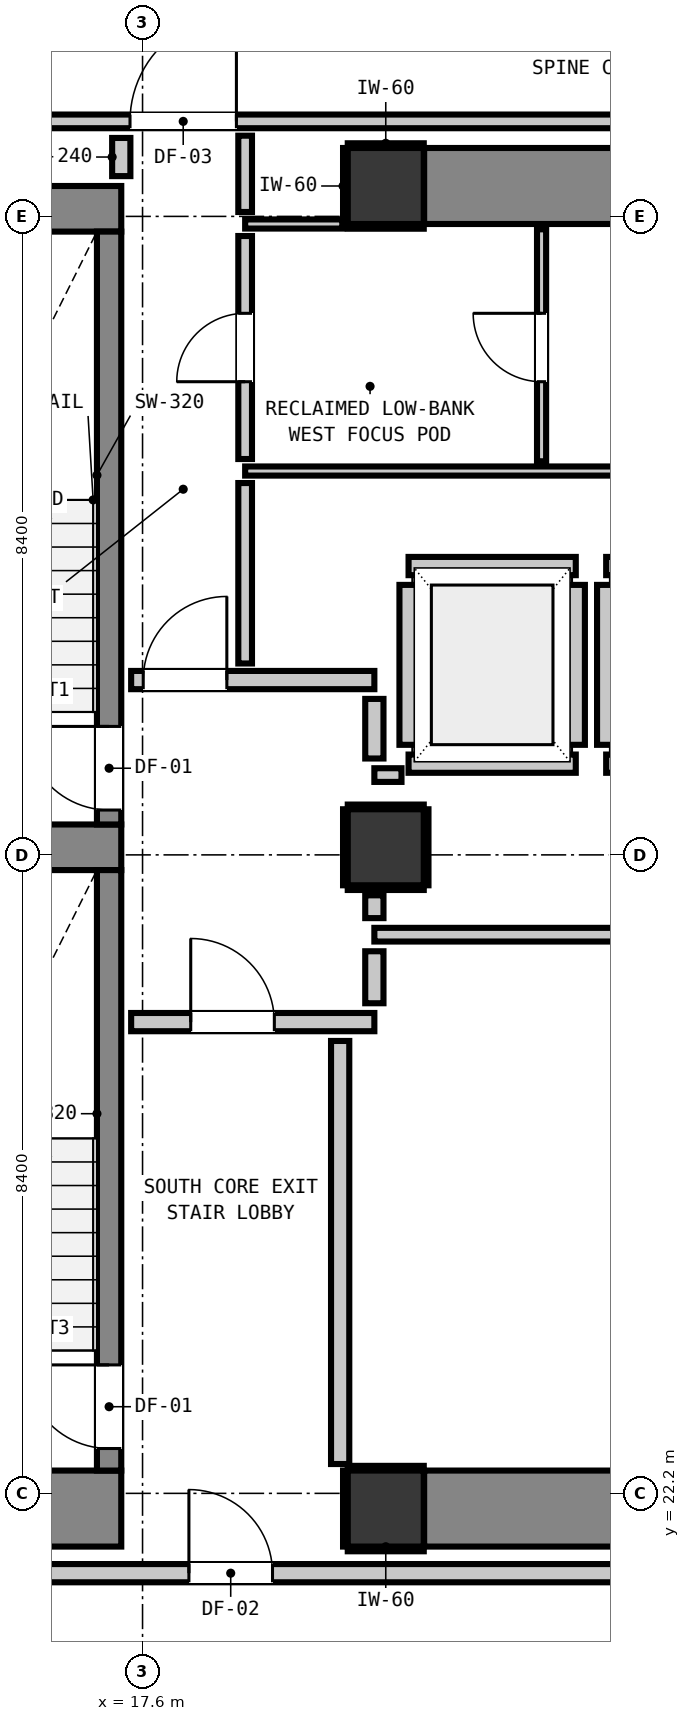
"""IFC4 building model, lengths in metres.
Left out: names, types, materials, properties, quantities, classifications, styles, units other than length and angle.
Written with IfcOpenShell. Run it as: python <this file> out.ifc"""

import sys

from ifc_helpers import new_model, si_unit, direction, frame, frame_2d, origin, origin_2d, place, context, subcontext, project, spatial, rectangle, extrude, element, fill, save


model = new_model("IFC4")
c1 = context("Model", 3, precision=1e-05, world=origin(), true_north=direction((0.0, 1.0)))
c2 = subcontext(c1, "Body", "Model", "MODEL_VIEW")
j1 = project(units=[si_unit("LENGTHUNIT", "METRE"), si_unit("PLANEANGLEUNIT", "RADIAN")], contexts=[c1])
p1 = place(None, origin())
s1 = spatial("IfcSite", under=j1, at=p1, CompositionType="ELEMENT")
p2 = place(p1, origin())
s2 = spatial("IfcBuilding", under=s1, at=p2, CompositionType="ELEMENT")
p3 = place(p2, frame((0.0, 0.0, 126.0)))
s3 = spatial("IfcBuildingStorey", under=s2, at=p3, CompositionType="ELEMENT", Elevation=126.0)
for number, where, z_axis, x_axis in (
    (1, (20.8, 22.0, 0.0), (0.0, 0.0, 1.0), (1.0, 0.0, 0.0)),
    (2, (20.8, 39.4, 0.0), (0.0, 0.0, 1.0), (1.0, 0.0, 0.0)),
):
    element("IfcColumn", number, at=place(p3, frame(where, z_axis=z_axis, x_axis=x_axis)), inside=s3, PredefinedType="COLUMN", context=c2, shape_type="SweptSolid", body=[
        extrude(rectangle(XDim=1.0, YDim=1.0, at=origin_2d()), origin(), (0.0, 0.0, 1.0), 3.32),
    ])
p4 = place(p3, frame((13.24, 22.0, 0.0), z_axis=(0.0, 0.0, 1.0), x_axis=(1.0, 0.0, 0.0)))
e3 = element("IfcWall", 3, at=p4, inside=s3, PredefinedType="SHEAR", context=c2, shape_type="SweptSolid", body=[
    extrude(rectangle(XDim=4.08, YDim=1.0, at=frame_2d((2.04, 0.0))), origin(), (0.0, 0.0, 1.0), 3.32),
])
p5 = place(p3, frame((13.24, 39.1, 0.0), z_axis=(0.0, 0.0, 1.0), x_axis=(1.0, 0.0, 0.0)))
e4 = element("IfcWall", 4, at=p5, inside=s3, PredefinedType="SHEAR", context=c2, shape_type="SweptSolid", body=[
    extrude(rectangle(XDim=4.08, YDim=0.6, at=frame_2d((2.04, 0.0))), origin(), (0.0, 0.0, 1.0), 3.32),
])
p6 = place(p3, frame((13.905, 30.7, 0.0), z_axis=(0.0, 0.0, 1.0), x_axis=(1.0, 0.0, 0.0)))
e5 = element("IfcWall", 5, at=p6, inside=s3, PredefinedType="SHEAR", context=c2, shape_type="SweptSolid", body=[
    extrude(rectangle(XDim=3.415, YDim=0.6, at=frame_2d((1.708, 0.0))), origin(), (0.0, 0.0, 1.0), 3.32),
])
for number, where, z_axis, x_axis in (
    (6, (21.305, 22.0, 0.0), (0.0, 0.0, 1.0), (1.0, 0.0, 0.0)),
    (7, (21.305, 39.4, 0.0), (0.0, 0.0, 1.0), (1.0, 0.0, 0.0)),
):
    element("IfcWall", number, at=place(p3, frame(where, z_axis=z_axis, x_axis=x_axis)), inside=s3, PredefinedType="SHEAR", context=c2, shape_type="SweptSolid", body=[
        extrude(rectangle(XDim=7.39, YDim=1.0, at=frame_2d((3.695, 0.0))), origin(), (0.0, 0.0, 1.0), 3.32),
    ])
p7 = place(p3, frame((17.16, 31.0, 0.0), z_axis=(0.0, 0.0, 1.0), x_axis=(0.0, 1.0, 0.0)))
e8 = element("IfcWall", 8, at=p7, inside=s3, PredefinedType="SHEAR", context=c2, shape_type="SweptSolid", body=[
    extrude(rectangle(XDim=7.8, YDim=0.32, at=frame_2d((3.9, 0.0))), origin(), (0.0, 0.0, 1.0), 3.32),
])
p8 = place(p7, frame((0.19, 0.0, 0.0)))
e9 = element("IfcOpeningElement", 9, at=p8, cuts=e8, PredefinedType="OPENING", context=c2, shape_type="SweptSolid", body=[
    extrude(rectangle(XDim=1.1, YDim=2.15, at=frame_2d((0.55, 1.075))), frame((0.0, 0.17, 0.0), z_axis=(0.0, -1.0, 0.0), x_axis=(1.0, 0.0, 0.0)), (0.0, 0.0, 1.0), 0.34),
])
p9 = place(p3, frame((17.16, 22.5, 0.0), z_axis=(0.0, 0.0, 1.0), x_axis=(0.0, 1.0, 0.0)))
e10 = element("IfcWall", 10, at=p9, inside=s3, PredefinedType="SHEAR", context=c2, shape_type="SweptSolid", body=[
    extrude(rectangle(XDim=7.9, YDim=0.32, at=frame_2d((3.95, 0.0))), origin(), (0.0, 0.0, 1.0), 3.32),
])
p10 = place(p9, frame((0.29, 0.0, 0.0)))
e11 = element("IfcOpeningElement", 11, at=p10, cuts=e10, PredefinedType="OPENING", context=c2, shape_type="SweptSolid", body=[
    extrude(rectangle(XDim=1.1, YDim=2.15, at=frame_2d((0.55, 1.075))), frame((0.0, 0.17, 0.0), z_axis=(0.0, -1.0, 0.0), x_axis=(1.0, 0.0, 0.0)), (0.0, 0.0, 1.0), 0.34),
])
p11 = place(p3, frame((20.8, 30.7, 0.0), z_axis=(0.0, 0.0, 1.0), x_axis=(1.0, 0.0, 0.0)))
e12 = element("IfcColumn", 12, at=p11, inside=s3, PredefinedType="COLUMN", context=c2, shape_type="SweptSolid", body=[
    extrude(rectangle(XDim=1.0, YDim=1.0, at=origin_2d()), origin(), (0.0, 0.0, 1.0), 3.32),
])
for number, where, z_axis, x_axis in (
    (13, (21.1, 31.8, 0.0), (0.0, 0.0, 1.0), (1.0, 0.0, 0.0)),
    (14, (21.1, 34.4, 0.0), (0.0, 0.0, 1.0), (1.0, 0.0, 0.0)),
):
    element("IfcWall", number, at=place(p3, frame(where, z_axis=z_axis, x_axis=x_axis)), inside=s3, PredefinedType="PARTITIONING", context=c2, shape_type="SweptSolid", body=[
        extrude(rectangle(XDim=2.2, YDim=0.24, at=frame_2d((1.1, 0.0))), origin(), (0.0, 0.0, 1.0), 3.08),
    ])
p12 = place(p3, frame((21.1, 32.048, 0.0), z_axis=(0.0, 0.0, 1.0), x_axis=(0.0, 1.0, 0.0)))
e15 = element("IfcWall", 15, at=p12, inside=s3, PredefinedType="PARTITIONING", context=c2, shape_type="SweptSolid", body=[
    extrude(rectangle(XDim=2.104, YDim=0.24, at=frame_2d((1.052, 0.0))), origin(), (0.0, 0.0, 1.0), 2.315),
])
p13 = place(p3, frame((23.3, 32.048, 0.0), z_axis=(0.0, 0.0, 1.0), x_axis=(0.0, 1.0, 0.0)))
e16 = element("IfcWall", 16, at=p13, inside=s3, PredefinedType="PARTITIONING", context=c2, shape_type="SweptSolid", body=[
    extrude(rectangle(XDim=2.104, YDim=0.24, at=frame_2d((1.052, 0.0))), origin(), (0.0, 0.0, 1.0), 3.08),
])
for number, where, z_axis, x_axis in (
    (17, (23.7, 31.8, 0.0), (0.0, 0.0, 1.0), (1.0, 0.0, 0.0)),
    (18, (23.7, 34.4, 0.0), (0.0, 0.0, 1.0), (1.0, 0.0, 0.0)),
):
    element("IfcWall", number, at=place(p3, frame(where, z_axis=z_axis, x_axis=x_axis)), inside=s3, PredefinedType="PARTITIONING", context=c2, shape_type="SweptSolid", body=[
        extrude(rectangle(XDim=2.2, YDim=0.24, at=frame_2d((1.1, 0.0))), origin(), (0.0, 0.0, 1.0), 3.08),
    ])
p14 = place(p3, frame((23.7, 32.048, 0.0), z_axis=(0.0, 0.0, 1.0), x_axis=(0.0, 1.0, 0.0)))
e19 = element("IfcWall", 19, at=p14, inside=s3, PredefinedType="PARTITIONING", context=c2, shape_type="SweptSolid", body=[
    extrude(rectangle(XDim=2.104, YDim=0.24, at=frame_2d((1.052, 0.0))), origin(), (0.0, 0.0, 1.0), 3.08),
])
p15 = place(p3, frame((9.407, 21.15, 0.0), z_axis=(0.0, 0.0, 1.0), x_axis=(1.0, 0.0, 0.0)))
e20 = element("IfcWall", 20, at=p15, inside=s3, PredefinedType="PARTITIONING", context=c2, shape_type="SweptSolid", body=[
    extrude(rectangle(XDim=39.386, YDim=0.24, at=frame_2d((19.693, 0.0))), origin(), (0.0, 0.0, 1.0), 3.08),
])
p16 = place(p15, frame((8.803, 0.0, 0.0)))
e21 = element("IfcOpeningElement", 21, at=p16, cuts=e20, PredefinedType="OPENING", context=c2, shape_type="SweptSolid", body=[
    extrude(rectangle(XDim=1.1, YDim=2.15, at=frame_2d((0.55, 1.075))), frame((0.0, 0.13, 0.0), z_axis=(0.0, -1.0, 0.0), x_axis=(1.0, 0.0, 0.0)), (0.0, 0.0, 1.0), 0.26),
])
p17 = place(p15, frame((1.192, 0.0, 0.0)))
e22 = element("IfcOpeningElement", 22, at=p17, cuts=e20, PredefinedType="OPENING", context=c2, shape_type="SweptSolid", body=[
    extrude(rectangle(XDim=1.4, YDim=2.15, at=frame_2d((0.7, 1.075))), frame((0.0, 0.13, 0.0), z_axis=(0.0, -1.0, 0.0), x_axis=(1.0, 0.0, 0.0)), (0.0, 0.0, 1.0), 0.26),
])
p18 = place(p15, frame((28.643, 0.0, 0.0)))
e23 = element("IfcOpeningElement", 23, at=p18, cuts=e20, PredefinedType="OPENING", context=c2, shape_type="SweptSolid", body=[
    extrude(rectangle(XDim=1.4, YDim=2.15, at=frame_2d((0.7, 1.075))), frame((0.0, 0.13, 0.0), z_axis=(0.0, -1.0, 0.0), x_axis=(1.0, 0.0, 0.0)), (0.0, 0.0, 1.0), 0.26),
])
p19 = place(p3, frame((17.45, 28.4, 0.0), z_axis=(0.0, 0.0, 1.0), x_axis=(1.0, 0.0, 0.0)))
e24 = element("IfcWall", 24, at=p19, inside=s3, PredefinedType="PARTITIONING", context=c2, shape_type="SweptSolid", body=[
    extrude(rectangle(XDim=3.2, YDim=0.24, at=frame_2d((1.6, 0.0))), origin(), (0.0, 0.0, 1.0), 3.08),
])
p20 = place(p19, frame((0.784, 0.0, 0.0)))
e25 = element("IfcOpeningElement", 25, at=p20, cuts=e24, PredefinedType="OPENING", context=c2, shape_type="SweptSolid", body=[
    extrude(rectangle(XDim=1.1, YDim=2.15, at=frame_2d((0.55, 1.075))), frame((0.0, 0.13, 0.0), z_axis=(0.0, -1.0, 0.0), x_axis=(1.0, 0.0, 0.0)), (0.0, 0.0, 1.0), 0.26),
])
p21 = place(p3, frame((17.45, 32.9, 0.0), z_axis=(0.0, 0.0, 1.0), x_axis=(1.0, 0.0, 0.0)))
e26 = element("IfcWall", 26, at=p21, inside=s3, PredefinedType="PARTITIONING", context=c2, shape_type="SweptSolid", body=[
    extrude(rectangle(XDim=3.2, YDim=0.24, at=frame_2d((1.6, 0.0))), origin(), (0.0, 0.0, 1.0), 3.08),
])
p22 = place(p21, frame((0.159, 0.0, 0.0)))
e27 = element("IfcOpeningElement", 27, at=p22, cuts=e26, PredefinedType="OPENING", context=c2, shape_type="SweptSolid", body=[
    extrude(rectangle(XDim=1.1, YDim=2.15, at=frame_2d((0.55, 1.075))), frame((0.0, 0.13, 0.0), z_axis=(0.0, -1.0, 0.0), x_axis=(1.0, 0.0, 0.0)), (0.0, 0.0, 1.0), 0.26),
])
p23 = place(p3, frame((20.65, 29.55, 0.0), z_axis=(0.0, 0.0, 1.0), x_axis=(1.0, 0.0, 0.0)))
e28 = element("IfcWall", 28, at=p23, inside=s3, PredefinedType="PARTITIONING", context=c2, shape_type="SweptSolid", body=[
    extrude(rectangle(XDim=9.325, YDim=0.18, at=frame_2d((4.663, 0.0))), origin(), (0.0, 0.0, 1.0), 3.08),
])
p24 = place(p3, frame((20.65, 31.65, 0.0), z_axis=(0.0, 0.0, 1.0), x_axis=(1.0, 0.0, 0.0)))
e29 = element("IfcWall", 29, at=p24, inside=s3, PredefinedType="PARTITIONING", context=c2, shape_type="SweptSolid", body=[
    extrude(rectangle(XDim=0.357, YDim=0.18, at=frame_2d((0.179, 0.0))), origin(), (0.0, 0.0, 1.0), 3.08),
])
p25 = place(p3, frame((9.407, 40.25, 0.0), z_axis=(0.0, 0.0, 1.0), x_axis=(1.0, 0.0, 0.0)))
e30 = element("IfcWall", 30, at=p25, inside=s3, PredefinedType="PARTITIONING", context=c2, shape_type="SweptSolid", body=[
    extrude(rectangle(XDim=27.536, YDim=0.18, at=frame_2d((13.768, 0.0))), origin(), (0.0, 0.0, 1.0), 3.08),
])
p26 = place(p25, frame((8.028, 0.0, 0.0)))
e31 = element("IfcOpeningElement", 31, at=p26, cuts=e30, PredefinedType="OPENING", context=c2, shape_type="SweptSolid", body=[
    extrude(rectangle(XDim=1.4, YDim=2.15, at=frame_2d((0.7, 1.075))), frame((0.0, 0.1, 0.0), z_axis=(0.0, -1.0, 0.0), x_axis=(1.0, 0.0, 0.0)), (0.0, 0.0, 1.0), 0.2),
])
p27 = place(p25, frame((1.192, 0.0, 0.0)))
e32 = element("IfcOpeningElement", 32, at=p27, cuts=e30, PredefinedType="OPENING", context=c2, shape_type="SweptSolid", body=[
    extrude(rectangle(XDim=1.4, YDim=2.15, at=frame_2d((0.7, 1.075))), frame((0.0, 0.1, 0.0), z_axis=(0.0, -1.0, 0.0), x_axis=(1.0, 0.0, 0.0)), (0.0, 0.0, 1.0), 0.2),
])
p28 = place(p3, frame((18.95, 35.65, 0.0), z_axis=(0.0, 0.0, 1.0), x_axis=(1.0, 0.0, 0.0)))
e33 = element("IfcWall", 33, at=p28, inside=s3, PredefinedType="PARTITIONING", context=c2, shape_type="SweptSolid", body=[
    extrude(rectangle(XDim=11.025, YDim=0.12, at=frame_2d((5.513, 0.0))), origin(), (0.0, 0.0, 1.0), 3.08),
])
p29 = place(p3, frame((18.95, 38.9, 0.0), z_axis=(0.0, 0.0, 1.0), x_axis=(1.0, 0.0, 0.0)))
e34 = element("IfcWall", 34, at=p29, inside=s3, PredefinedType="PARTITIONING", context=c2, shape_type="SweptSolid", body=[
    extrude(rectangle(XDim=1.278, YDim=0.12, at=frame_2d((0.639, 0.0))), origin(), (0.0, 0.0, 1.0), 3.08),
])
p30 = place(p3, frame((17.32, 39.53, 0.0), z_axis=(0.0, 0.0, 1.0), x_axis=(0.0, 1.0, 0.0)))
e35 = element("IfcWall", 35, at=p30, inside=s3, PredefinedType="PARTITIONING", context=c2, shape_type="SweptSolid", body=[
    extrude(rectangle(XDim=0.502, YDim=0.24, at=frame_2d((0.251, 0.0))), origin(), (0.0, 0.0, 1.0), 3.08),
])
p31 = place(p3, frame((20.2, 22.586, 0.0), z_axis=(0.0, 0.0, 1.0), x_axis=(0.0, 1.0, 0.0)))
e36 = element("IfcWall", 36, at=p31, inside=s3, PredefinedType="PARTITIONING", context=c2, shape_type="SweptSolid", body=[
    extrude(rectangle(XDim=5.566, YDim=0.24, at=frame_2d((2.783, 0.0))), origin(), (0.0, 0.0, 1.0), 3.08),
])
p32 = place(p3, frame((20.65, 28.648, 0.0), z_axis=(0.0, 0.0, 1.0), x_axis=(0.0, 1.0, 0.0)))
e37 = element("IfcWall", 37, at=p32, inside=s3, PredefinedType="PARTITIONING", context=c2, shape_type="SweptSolid", body=[
    extrude(rectangle(XDim=0.684, YDim=0.24, at=frame_2d((0.342, 0.0))), origin(), (0.0, 0.0, 1.0), 2.315),
])
p33 = place(p3, frame((20.65, 29.768, 0.0), z_axis=(0.0, 0.0, 1.0), x_axis=(0.0, 1.0, 0.0)))
e38 = element("IfcWall", 38, at=p33, inside=s3, PredefinedType="PARTITIONING", context=c2, shape_type="SweptSolid", body=[
    extrude(rectangle(XDim=0.3, YDim=0.24, at=frame_2d((0.15, 0.0))), origin(), (0.0, 0.0, 1.0), 2.315),
])
p34 = place(p3, frame((20.65, 31.868, 0.0), z_axis=(0.0, 0.0, 1.0), x_axis=(0.0, 1.0, 0.0)))
e39 = element("IfcWall", 39, at=p34, inside=s3, PredefinedType="PARTITIONING", context=c2, shape_type="SweptSolid", body=[
    extrude(rectangle(XDim=0.784, YDim=0.24, at=frame_2d((0.392, 0.0))), origin(), (0.0, 0.0, 1.0), 2.315),
])
p35 = place(p3, frame((18.95, 33.118, 0.0), z_axis=(0.0, 0.0, 1.0), x_axis=(0.0, 1.0, 0.0)))
e40 = element("IfcWall", 40, at=p35, inside=s3, PredefinedType="PARTITIONING", context=c2, shape_type="SweptSolid", body=[
    extrude(rectangle(XDim=2.374, YDim=0.18, at=frame_2d((1.187, 0.0))), origin(), (0.0, 0.0, 1.0), 3.08),
])
p36 = place(p3, frame((18.95, 35.808, 0.0), z_axis=(0.0, 0.0, 1.0), x_axis=(0.0, 1.0, 0.0)))
e41 = element("IfcWall", 41, at=p36, inside=s3, PredefinedType="PARTITIONING", context=c2, shape_type="SweptSolid", body=[
    extrude(rectangle(XDim=2.934, YDim=0.18, at=frame_2d((1.467, 0.0))), origin(), (0.0, 0.0, 1.0), 3.08),
])
p37 = place(p36, frame((1.017, 0.0, 0.0)))
e42 = element("IfcOpeningElement", 42, at=p37, cuts=e41, PredefinedType="OPENING", context=c2, shape_type="SweptSolid", body=[
    extrude(rectangle(XDim=0.9, YDim=2.1, at=frame_2d((0.45, 1.05))), frame((0.0, 0.1, 0.0), z_axis=(0.0, -1.0, 0.0), x_axis=(1.0, 0.0, 0.0)), (0.0, 0.0, 1.0), 0.2),
])
p38 = place(p3, frame((18.95, 39.058, 0.0), z_axis=(0.0, 0.0, 1.0), x_axis=(0.0, 1.0, 0.0)))
e43 = element("IfcWall", 43, at=p38, inside=s3, PredefinedType="PARTITIONING", context=c2, shape_type="SweptSolid", body=[
    extrude(rectangle(XDim=1.004, YDim=0.18, at=frame_2d((0.502, 0.0))), origin(), (0.0, 0.0, 1.0), 3.08),
])
p39 = place(p3, frame((22.85, 35.778, 0.0), z_axis=(0.0, 0.0, 1.0), x_axis=(0.0, 1.0, 0.0)))
e44 = element("IfcWall", 44, at=p39, inside=s3, PredefinedType="PARTITIONING", context=c2, shape_type="SweptSolid", body=[
    extrude(rectangle(XDim=3.052, YDim=0.12, at=frame_2d((1.526, 0.0))), origin(), (0.0, 0.0, 1.0), 3.08),
])
p40 = place(p39, frame((1.047, 0.0, 0.0)))
e45 = element("IfcOpeningElement", 45, at=p40, cuts=e44, PredefinedType="OPENING", context=c2, shape_type="SweptSolid", body=[
    extrude(rectangle(XDim=0.9, YDim=2.1, at=frame_2d((0.45, 1.05))), frame((0.0, 0.07, 0.0), z_axis=(0.0, -1.0, 0.0), x_axis=(1.0, 0.0, 0.0)), (0.0, 0.0, 1.0), 0.14),
])
for number, where, z_axis, x_axis in (
    (46, (20.3, 21.468, 0.0), (0.0, 0.0, 1.0), (1.0, 0.0, 0.0)),
    (47, (20.3, 22.532, 0.0), (0.0, 0.0, 1.0), (1.0, 0.0, 0.0)),
    (48, (20.268, 21.5, 0.0), (0.0, 0.0, 1.0), (0.0, 1.0, 0.0)),
    (49, (20.3, 38.868, 0.0), (0.0, 0.0, 1.0), (1.0, 0.0, 0.0)),
    (50, (20.3, 39.932, 0.0), (0.0, 0.0, 1.0), (1.0, 0.0, 0.0)),
    (51, (20.268, 38.9, 0.0), (0.0, 0.0, 1.0), (0.0, 1.0, 0.0)),
    (52, (20.3, 30.168, 0.0), (0.0, 0.0, 1.0), (1.0, 0.0, 0.0)),
    (53, (20.3, 31.232, 0.0), (0.0, 0.0, 1.0), (1.0, 0.0, 0.0)),
    (54, (20.268, 30.2, 0.0), (0.0, 0.0, 1.0), (0.0, 1.0, 0.0)),
    (55, (21.332, 30.2, 0.0), (0.0, 0.0, 1.0), (0.0, 1.0, 0.0)),
):
    element("IfcWall", number, at=place(p3, frame(where, z_axis=z_axis, x_axis=x_axis)), inside=s3, PredefinedType="PARTITIONING", context=c2, shape_type="SweptSolid", body=[
        extrude(rectangle(XDim=1.0, YDim=0.06, at=frame_2d((0.5, 0.0))), origin(), (0.0, 0.0, 1.0), 1.45),
    ])
p41 = place(p8, origin())
e56 = element("IfcDoor", 56, at=p41, inside=s3, OperationType="SINGLE_SWING_RIGHT", PredefinedType="DOOR", context=c2, shape_type="SweptSolid", body=[
    extrude(rectangle(XDim=1.1, YDim=2.15, at=frame_2d((0.55, 1.075))), frame((0.0, 0.025, 0.0), z_axis=(0.0, -1.0, 0.0), x_axis=(1.0, 0.0, 0.0)), (0.0, 0.0, 1.0), 0.05),
])
fill(e9, e56)
p42 = place(p10, origin())
e57 = element("IfcDoor", 57, at=p42, inside=s3, OperationType="SINGLE_SWING_RIGHT", PredefinedType="DOOR", context=c2, shape_type="SweptSolid", body=[
    extrude(rectangle(XDim=1.1, YDim=2.15, at=frame_2d((0.55, 1.075))), frame((0.0, 0.025, 0.0), z_axis=(0.0, -1.0, 0.0), x_axis=(1.0, 0.0, 0.0)), (0.0, 0.0, 1.0), 0.05),
])
fill(e11, e57)
p43 = place(p20, origin())
e58 = element("IfcDoor", 58, at=p43, inside=s3, OperationType="SINGLE_SWING_LEFT", PredefinedType="DOOR", context=c2, shape_type="SweptSolid", body=[
    extrude(rectangle(XDim=1.1, YDim=2.15, at=frame_2d((0.55, 1.075))), frame((0.0, 0.025, 0.0), z_axis=(0.0, -1.0, 0.0), x_axis=(1.0, 0.0, 0.0)), (0.0, 0.0, 1.0), 0.05),
])
fill(e25, e58)
p44 = place(p22, origin())
e59 = element("IfcDoor", 59, at=p44, inside=s3, OperationType="SINGLE_SWING_RIGHT", PredefinedType="DOOR", context=c2, shape_type="SweptSolid", body=[
    extrude(rectangle(XDim=1.1, YDim=2.15, at=frame_2d((0.55, 1.075))), frame((0.0, 0.025, 0.0), z_axis=(0.0, -1.0, 0.0), x_axis=(1.0, 0.0, 0.0)), (0.0, 0.0, 1.0), 0.05),
])
fill(e27, e59)
p45 = place(p16, origin())
e60 = element("IfcDoor", 60, at=p45, inside=s3, OperationType="SINGLE_SWING_LEFT", PredefinedType="DOOR", context=c2, shape_type="SweptSolid", body=[
    extrude(rectangle(XDim=1.1, YDim=2.15, at=frame_2d((0.55, 1.075))), frame((0.0, 0.025, 0.0), z_axis=(0.0, -1.0, 0.0), x_axis=(1.0, 0.0, 0.0)), (0.0, 0.0, 1.0), 0.05),
])
fill(e21, e60)
p46 = place(p26, origin())
e61 = element("IfcDoor", 61, at=p46, inside=s3, OperationType="SINGLE_SWING_RIGHT", PredefinedType="DOOR", context=c2, shape_type="SweptSolid", body=[
    extrude(rectangle(XDim=1.4, YDim=2.15, at=frame_2d((0.7, 1.075))), frame((0.0, 0.025, 0.0), z_axis=(0.0, -1.0, 0.0), x_axis=(1.0, 0.0, 0.0)), (0.0, 0.0, 1.0), 0.05),
])
fill(e31, e61)
p47 = place(p37, origin())
e62 = element("IfcDoor", 62, at=p47, inside=s3, OperationType="SINGLE_SWING_LEFT", PredefinedType="DOOR", context=c2, shape_type="SweptSolid", body=[
    extrude(rectangle(XDim=0.9, YDim=2.1, at=frame_2d((0.45, 1.05))), frame((0.0, 0.025, 0.0), z_axis=(0.0, -1.0, 0.0), x_axis=(1.0, 0.0, 0.0)), (0.0, 0.0, 1.0), 0.05),
])
fill(e42, e62)
p48 = place(p40, origin())
e63 = element("IfcDoor", 63, at=p48, inside=s3, OperationType="SINGLE_SWING_RIGHT", PredefinedType="DOOR", context=c2, shape_type="SweptSolid", body=[
    extrude(rectangle(XDim=0.9, YDim=2.1, at=frame_2d((0.45, 1.05))), frame((0.0, 0.025, 0.0), z_axis=(0.0, -1.0, 0.0), x_axis=(1.0, 0.0, 0.0)), (0.0, 0.0, 1.0), 0.05),
])
fill(e45, e63)
save(model, sys.argv[1])
